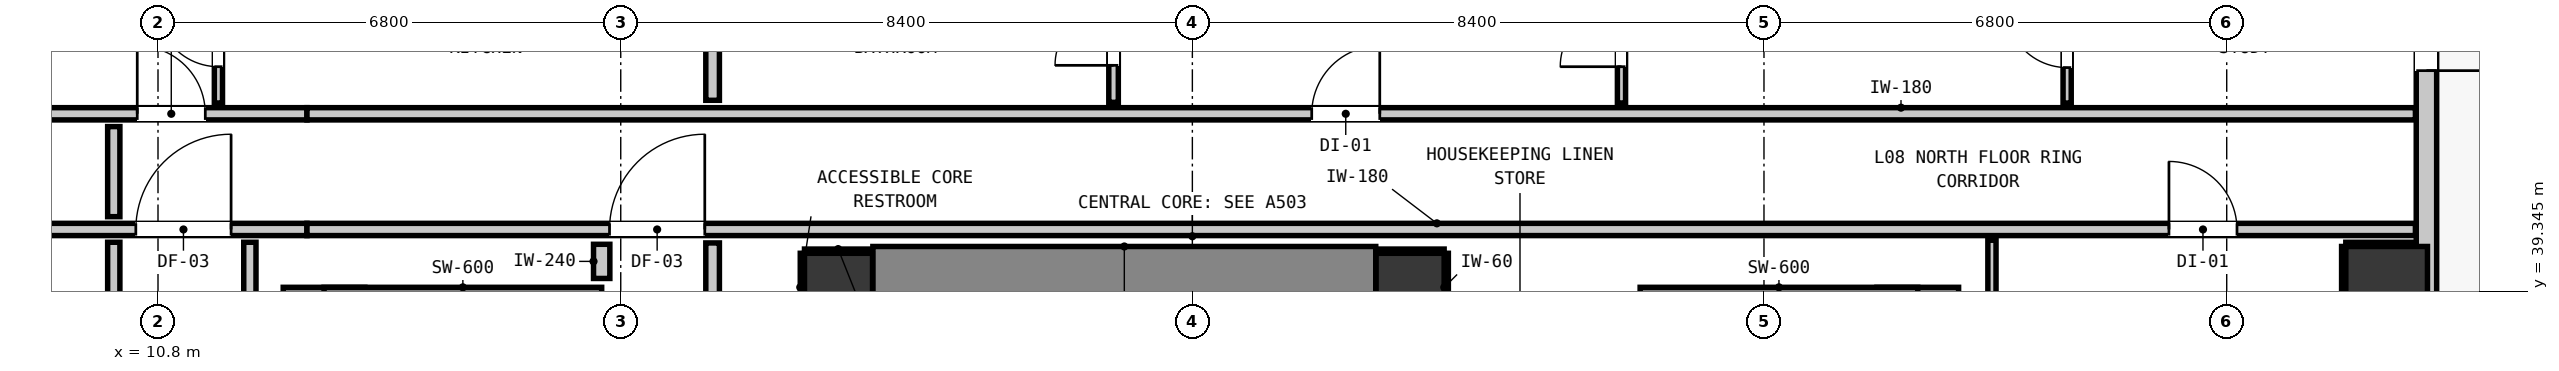
"""IFC4 building model, lengths in metres.
Left out: names, types, materials, properties, quantities, classifications, styles, units other than length and angle.
Written with IfcOpenShell. Run it as: python <this file> out.ifc"""

import sys

from ifc_helpers import new_model, si_unit, direction, frame, frame_2d, origin, origin_2d, place, context, subcontext, project, spatial, rectangle, extrude, element, fill, save


model = new_model("IFC4")
c1 = context("Model", 3, precision=1e-05, world=origin(), true_north=direction((0.0, 1.0)))
c2 = subcontext(c1, "Body", "Model", "MODEL_VIEW")
j1 = project(units=[si_unit("LENGTHUNIT", "METRE"), si_unit("PLANEANGLEUNIT", "RADIAN")], contexts=[c1])
p1 = place(None, origin())
s1 = spatial("IfcSite", under=j1, at=p1, CompositionType="ELEMENT")
p2 = place(p1, origin())
s2 = spatial("IfcBuilding", under=s1, at=p2, CompositionType="ELEMENT")
p3 = place(p2, frame((0.0, 0.0, 31.96)))
s3 = spatial("IfcBuildingStorey", under=s2, at=p3, CompositionType="ELEMENT", Elevation=31.96)
for number, where, z_axis, x_axis in (
    (1, (20.8, 39.4, 0.0), (0.0, 0.0, 1.0), (1.0, 0.0, 0.0)),
    (2, (29.2, 39.4, 0.0), (0.0, 0.0, 1.0), (1.0, 0.0, 0.0)),
):
    element("IfcColumn", number, at=place(p3, frame(where, z_axis=z_axis, x_axis=x_axis)), inside=s3, PredefinedType="COLUMN", context=c2, shape_type="SweptSolid", body=[
        extrude(rectangle(XDim=1.0, YDim=1.0, at=origin_2d()), origin(), (0.0, 0.0, 1.0), 3.32),
    ])
p4 = place(p3, frame((13.24, 31.205, 0.0), z_axis=(0.0, 0.0, 1.0), x_axis=(0.0, 1.0, 0.0)))
e3 = element("IfcWall", 3, at=p4, inside=s3, PredefinedType="SHEAR", context=c2, shape_type="SweptSolid", body=[
    extrude(rectangle(XDim=8.195, YDim=1.2, at=frame_2d((4.097, 0.0))), origin(), (0.0, 0.0, 1.0), 3.32),
])
p5 = place(p3, frame((13.24, 39.1, 0.0), z_axis=(0.0, 0.0, 1.0), x_axis=(1.0, 0.0, 0.0)))
e4 = element("IfcWall", 4, at=p5, inside=s3, PredefinedType="SHEAR", context=c2, shape_type="SweptSolid", body=[
    extrude(rectangle(XDim=4.08, YDim=0.6, at=frame_2d((2.04, 0.0))), origin(), (0.0, 0.0, 1.0), 3.32),
])
p6 = place(p3, frame((36.66, 31.205, 0.0), z_axis=(0.0, 0.0, 1.0), x_axis=(0.0, 1.0, 0.0)))
e5 = element("IfcWall", 5, at=p6, inside=s3, PredefinedType="SHEAR", context=c2, shape_type="SweptSolid", body=[
    extrude(rectangle(XDim=8.195, YDim=1.2, at=frame_2d((4.097, 0.0))), origin(), (0.0, 0.0, 1.0), 3.32),
])
p7 = place(p3, frame((32.58, 39.1, 0.0), z_axis=(0.0, 0.0, 1.0), x_axis=(1.0, 0.0, 0.0)))
e6 = element("IfcWall", 6, at=p7, inside=s3, PredefinedType="SHEAR", context=c2, shape_type="SweptSolid", body=[
    extrude(rectangle(XDim=4.08, YDim=0.6, at=frame_2d((2.04, 0.0))), origin(), (0.0, 0.0, 1.0), 3.32),
])
p8 = place(p3, frame((21.305, 39.4, 0.0), z_axis=(0.0, 0.0, 1.0), x_axis=(1.0, 0.0, 0.0)))
e7 = element("IfcWall", 7, at=p8, inside=s3, PredefinedType="SHEAR", context=c2, shape_type="SweptSolid", body=[
    extrude(rectangle(XDim=7.39, YDim=1.2, at=frame_2d((3.695, 0.0))), origin(), (0.0, 0.0, 1.0), 3.32),
])
p9 = place(p3, frame((43.55, 39.4, 0.0), z_axis=(0.0, 0.0, 1.0), x_axis=(1.0, 0.0, 0.0)))
e8 = element("IfcColumn", 8, at=p9, inside=s3, PredefinedType="COLUMN", context=c2, shape_type="SweptSolid", body=[
    extrude(rectangle(XDim=1.2, YDim=1.2, at=origin_2d()), origin(), (0.0, 0.0, 1.0), 3.32),
])
p10 = place(p3, frame((44.135, 44.835, 0.0), z_axis=(0.0, 0.0, 1.0), x_axis=(0.0, -1.0, 0.0)))
e9 = element("IfcWall", 9, at=p10, inside=s3, PredefinedType="STANDARD", context=c2, shape_type="SweptSolid", body=[
    extrude(rectangle(XDim=34.67, YDim=0.3, at=frame_2d((17.335, 0.0))), origin(), (0.0, 0.0, 1.0), 3.06),
])
p11 = place(p10, frame((1.251, 0.0, 0.0)))
e10 = element("IfcOpeningElement", 10, at=p11, cuts=e9, PredefinedType="OPENING", context=c2, shape_type="SweptSolid", body=[
    extrude(rectangle(XDim=1.0, YDim=2.15, at=frame_2d((0.5, 1.075))), frame((0.0, 0.16, 0.0), z_axis=(0.0, -1.0, 0.0), x_axis=(1.0, 0.0, 0.0)), (0.0, 0.0, 1.0), 0.32),
])
p12 = place(p10, frame((32.583, 0.0, 0.85)))
e11 = element("IfcOpeningElement", 11, at=p12, cuts=e9, PredefinedType="OPENING", context=c2, shape_type="SweptSolid", body=[
    extrude(rectangle(XDim=1.35, YDim=1.85, at=frame_2d((0.675, 0.925))), frame((0.0, 0.16, 0.0), z_axis=(0.0, -1.0, 0.0), x_axis=(1.0, 0.0, 0.0)), (0.0, 0.0, 1.0), 0.32),
])
p13 = place(p10, frame((17.81, 0.0, 0.85)))
e12 = element("IfcOpeningElement", 12, at=p13, cuts=e9, PredefinedType="OPENING", context=c2, shape_type="SweptSolid", body=[
    extrude(rectangle(XDim=1.35, YDim=1.85, at=frame_2d((0.675, 0.925))), frame((0.0, 0.16, 0.0), z_axis=(0.0, -1.0, 0.0), x_axis=(1.0, 0.0, 0.0)), (0.0, 0.0, 1.0), 0.32),
])
p14 = place(p10, frame((6.834, 0.0, 0.85)))
e13 = element("IfcOpeningElement", 13, at=p14, cuts=e9, PredefinedType="OPENING", context=c2, shape_type="SweptSolid", body=[
    extrude(rectangle(XDim=1.35, YDim=1.85, at=frame_2d((0.675, 0.925))), frame((0.0, 0.16, 0.0), z_axis=(0.0, -1.0, 0.0), x_axis=(1.0, 0.0, 0.0)), (0.0, 0.0, 1.0), 0.32),
])
p15 = place(p3, frame((2.661, 40.25, 0.0), z_axis=(0.0, 0.0, 1.0), x_axis=(1.0, 0.0, 0.0)))
e14 = element("IfcWall", 14, at=p15, inside=s3, PredefinedType="PARTITIONING", context=c2, shape_type="SweptSolid", body=[
    extrude(rectangle(XDim=10.328, YDim=0.18, at=frame_2d((5.164, 0.0))), origin(), (0.0, 0.0, 1.0), 2.445),
])
p16 = place(p15, frame((7.813, 0.0, 0.0)))
e15 = element("IfcOpeningElement", 15, at=p16, cuts=e14, PredefinedType="OPENING", context=c2, shape_type="SweptSolid", body=[
    extrude(rectangle(XDim=1.4, YDim=2.15, at=frame_2d((0.7, 1.075))), frame((0.0, 0.1, 0.0), z_axis=(0.0, -1.0, 0.0), x_axis=(1.0, 0.0, 0.0)), (0.0, 0.0, 1.0), 0.2),
])
p17 = place(p3, frame((12.989, 40.25, 0.0), z_axis=(0.0, 0.0, 1.0), x_axis=(1.0, 0.0, 0.0)))
e16 = element("IfcWall", 16, at=p17, inside=s3, PredefinedType="PARTITIONING", context=c2, shape_type="SweptSolid", body=[
    extrude(rectangle(XDim=30.984, YDim=0.18, at=frame_2d((15.492, 0.0))), origin(), (0.0, 0.0, 1.0), 3.06),
])
p18 = place(p17, frame((4.446, 0.0, 0.0)))
e17 = element("IfcOpeningElement", 17, at=p18, cuts=e16, PredefinedType="OPENING", context=c2, shape_type="SweptSolid", body=[
    extrude(rectangle(XDim=1.4, YDim=2.15, at=frame_2d((0.7, 1.075))), frame((0.0, 0.1, 0.0), z_axis=(0.0, -1.0, 0.0), x_axis=(1.0, 0.0, 0.0)), (0.0, 0.0, 1.0), 0.2),
])
p19 = place(p17, frame((27.362, 0.0, 0.0)))
e18 = element("IfcOpeningElement", 18, at=p19, cuts=e16, PredefinedType="OPENING", context=c2, shape_type="SweptSolid", body=[
    extrude(rectangle(XDim=1.0, YDim=2.15, at=frame_2d((0.5, 1.075))), frame((0.0, 0.1, 0.0), z_axis=(0.0, -1.0, 0.0), x_axis=(1.0, 0.0, 0.0)), (0.0, 0.0, 1.0), 0.2),
])
p20 = place(p3, frame((2.661, 41.95, 0.0), z_axis=(0.0, 0.0, 1.0), x_axis=(1.0, 0.0, 0.0)))
e19 = element("IfcWall", 19, at=p20, inside=s3, PredefinedType="PARTITIONING", context=c2, shape_type="SweptSolid", body=[
    extrude(rectangle(XDim=10.328, YDim=0.18, at=frame_2d((5.164, 0.0))), origin(), (0.0, 0.0, 1.0), 2.445),
])
p21 = place(p20, frame((7.834, 0.0, 0.0)))
e20 = element("IfcOpeningElement", 20, at=p21, cuts=e19, PredefinedType="OPENING", context=c2, shape_type="SweptSolid", body=[
    extrude(rectangle(XDim=1.0, YDim=2.15, at=frame_2d((0.5, 1.075))), frame((0.0, 0.1, 0.0), z_axis=(0.0, -1.0, 0.0), x_axis=(1.0, 0.0, 0.0)), (0.0, 0.0, 1.0), 0.2),
])
p22 = place(p3, frame((12.989, 41.95, 0.0), z_axis=(0.0, 0.0, 1.0), x_axis=(1.0, 0.0, 0.0)))
e21 = element("IfcWall", 21, at=p22, inside=s3, PredefinedType="PARTITIONING", context=c2, shape_type="SweptSolid", body=[
    extrude(rectangle(XDim=30.984, YDim=0.18, at=frame_2d((15.492, 0.0))), origin(), (0.0, 0.0, 1.0), 3.06),
])
p23 = place(p22, frame((14.765, 0.0, 0.0)))
e22 = element("IfcOpeningElement", 22, at=p23, cuts=e21, PredefinedType="OPENING", context=c2, shape_type="SweptSolid", body=[
    extrude(rectangle(XDim=1.0, YDim=2.15, at=frame_2d((0.5, 1.075))), frame((0.0, 0.1, 0.0), z_axis=(0.0, -1.0, 0.0), x_axis=(1.0, 0.0, 0.0)), (0.0, 0.0, 1.0), 0.2),
])
p24 = place(p3, frame((17.32, 39.53, 0.0), z_axis=(0.0, 0.0, 1.0), x_axis=(0.0, 1.0, 0.0)))
e23 = element("IfcWall", 23, at=p24, inside=s3, PredefinedType="PARTITIONING", context=c2, shape_type="SweptSolid", body=[
    extrude(rectangle(XDim=0.502, YDim=0.24, at=frame_2d((0.251, 0.0))), origin(), (0.0, 0.0, 1.0), 3.06),
])
p25 = place(p3, frame((18.95, 38.928, 0.0), z_axis=(0.0, 0.0, 1.0), x_axis=(0.0, 1.0, 0.0)))
e24 = element("IfcWall", 24, at=p25, inside=s3, PredefinedType="PARTITIONING", context=c2, shape_type="SweptSolid", body=[
    extrude(rectangle(XDim=1.124, YDim=0.2, at=frame_2d((0.562, 0.0))), origin(), (0.0, 0.0, 1.0), 3.06),
])
p26 = place(p3, frame((18.95, 42.148, 0.0), z_axis=(0.0, 0.0, 1.0), x_axis=(0.0, 1.0, 0.0)))
e25 = element("IfcWall", 25, at=p26, inside=s3, PredefinedType="PARTITIONING", context=c2, shape_type="SweptSolid", body=[
    extrude(rectangle(XDim=1.882, YDim=0.2, at=frame_2d((0.941, 0.0))), origin(), (0.0, 0.0, 1.0), 3.06),
])
p27 = place(p3, frame((10.15, 34.688, 0.0), z_axis=(0.0, 0.0, 1.0), x_axis=(0.0, 1.0, 0.0)))
e26 = element("IfcWall", 26, at=p27, inside=s3, PredefinedType="PARTITIONING", context=c2, shape_type="SweptSolid", body=[
    extrude(rectangle(XDim=5.374, YDim=0.18, at=frame_2d((2.687, 0.0))), origin(), (0.0, 0.0, 1.0), 3.06),
])
p28 = place(p3, frame((10.15, 40.438, 0.0), z_axis=(0.0, 0.0, 1.0), x_axis=(0.0, 1.0, 0.0)))
e27 = element("IfcWall", 27, at=p28, inside=s3, PredefinedType="PARTITIONING", context=c2, shape_type="SweptSolid", body=[
    extrude(rectangle(XDim=1.324, YDim=0.18, at=frame_2d((0.662, 0.0))), origin(), (0.0, 0.0, 1.0), 3.06),
])
p29 = place(p3, frame((12.15, 21.368, 0.0), z_axis=(0.0, 0.0, 1.0), x_axis=(0.0, 1.0, 0.0)))
e28 = element("IfcWall", 28, at=p29, inside=s3, PredefinedType="PARTITIONING", context=c2, shape_type="SweptSolid", body=[
    extrude(rectangle(XDim=18.694, YDim=0.18, at=frame_2d((9.347, 0.0))), origin(), (0.0, 0.0, 1.0), 3.06),
])
p30 = place(p3, frame((24.842, 42.118, 0.0), z_axis=(0.0, 0.0, 1.0), x_axis=(0.0, 1.0, 0.0)))
e29 = element("IfcWall", 29, at=p30, inside=s3, PredefinedType="PARTITIONING", context=c2, shape_type="SweptSolid", body=[
    extrude(rectangle(XDim=1.942, YDim=0.14, at=frame_2d((0.971, 0.0))), origin(), (0.0, 0.0, 1.0), 3.06),
])
p31 = place(p30, frame((0.544, 0.0, 0.0)))
e30 = element("IfcOpeningElement", 30, at=p31, cuts=e29, PredefinedType="OPENING", context=c2, shape_type="SweptSolid", body=[
    extrude(rectangle(XDim=0.86, YDim=2.02, at=frame_2d((0.43, 1.01))), frame((0.0, 0.08, 0.0), z_axis=(0.0, -1.0, 0.0), x_axis=(1.0, 0.0, 0.0)), (0.0, 0.0, 1.0), 0.16),
])
p32 = place(p3, frame((11.688, 42.108, 0.0), z_axis=(0.0, 0.0, 1.0), x_axis=(0.0, 1.0, 0.0)))
e31 = element("IfcWall", 31, at=p32, inside=s3, PredefinedType="PARTITIONING", context=c2, shape_type="SweptSolid", body=[
    extrude(rectangle(XDim=5.065, YDim=0.12, at=frame_2d((2.533, 0.0))), origin(), (0.0, 0.0, 1.0), 3.06),
])
p33 = place(p32, frame((0.534, 0.0, 0.0)))
e32 = element("IfcOpeningElement", 32, at=p33, cuts=e31, PredefinedType="OPENING", context=c2, shape_type="SweptSolid", body=[
    extrude(rectangle(XDim=0.9, YDim=2.1, at=frame_2d((0.45, 1.05))), frame((0.0, 0.07, 0.0), z_axis=(0.0, -1.0, 0.0), x_axis=(1.0, 0.0, 0.0)), (0.0, 0.0, 1.0), 0.14),
])
p34 = place(p32, frame((2.893, 0.0, 0.0)))
e33 = element("IfcOpeningElement", 33, at=p34, cuts=e31, PredefinedType="OPENING", context=c2, shape_type="SweptSolid", body=[
    extrude(rectangle(XDim=0.9, YDim=2.1, at=frame_2d((0.45, 1.05))), frame((0.0, 0.07, 0.0), z_axis=(0.0, -1.0, 0.0), x_axis=(1.0, 0.0, 0.0)), (0.0, 0.0, 1.0), 0.14),
])
p35 = place(p3, frame((32.306, 42.108, 0.0), z_axis=(0.0, 0.0, 1.0), x_axis=(0.0, 1.0, 0.0)))
e34 = element("IfcWall", 34, at=p35, inside=s3, PredefinedType="PARTITIONING", context=c2, shape_type="SweptSolid", body=[
    extrude(rectangle(XDim=1.962, YDim=0.12, at=frame_2d((0.981, 0.0))), origin(), (0.0, 0.0, 1.0), 3.06),
])
p36 = place(p35, frame((0.534, 0.0, 0.0)))
e35 = element("IfcOpeningElement", 35, at=p36, cuts=e34, PredefinedType="OPENING", context=c2, shape_type="SweptSolid", body=[
    extrude(rectangle(XDim=0.9, YDim=2.1, at=frame_2d((0.45, 1.05))), frame((0.0, 0.07, 0.0), z_axis=(0.0, -1.0, 0.0), x_axis=(1.0, 0.0, 0.0)), (0.0, 0.0, 1.0), 0.14),
])
p37 = place(p3, frame((37.75, 35.818, 0.0), z_axis=(0.0, 0.0, 1.0), x_axis=(0.0, 1.0, 0.0)))
e36 = element("IfcWall", 36, at=p37, inside=s3, PredefinedType="PARTITIONING", context=c2, shape_type="SweptSolid", body=[
    extrude(rectangle(XDim=4.274, YDim=0.12, at=frame_2d((2.137, 0.0))), origin(), (0.0, 0.0, 1.0), 3.06),
])
p38 = place(p3, frame((38.855, 42.108, 0.0), z_axis=(0.0, 0.0, 1.0), x_axis=(0.0, 1.0, 0.0)))
e37 = element("IfcWall", 37, at=p38, inside=s3, PredefinedType="PARTITIONING", context=c2, shape_type="SweptSolid", body=[
    extrude(rectangle(XDim=1.962, YDim=0.12, at=frame_2d((0.981, 0.0))), origin(), (0.0, 0.0, 1.0), 3.06),
])
p39 = place(p38, frame((0.521, 0.0, 0.0)))
e38 = element("IfcOpeningElement", 38, at=p39, cuts=e37, PredefinedType="OPENING", context=c2, shape_type="SweptSolid", body=[
    extrude(rectangle(XDim=0.9, YDim=2.1, at=frame_2d((0.45, 1.05))), frame((0.0, 0.07, 0.0), z_axis=(0.0, -1.0, 0.0), x_axis=(1.0, 0.0, 0.0)), (0.0, 0.0, 1.0), 0.14),
])
p40 = place(p3, frame((20.3, 39.932, 0.0), z_axis=(0.0, 0.0, 1.0), x_axis=(1.0, 0.0, 0.0)))
e39 = element("IfcWall", 39, at=p40, inside=s3, PredefinedType="PARTITIONING", context=c2, shape_type="SweptSolid", body=[
    extrude(rectangle(XDim=0.99, YDim=0.06, at=frame_2d((0.495, 0.0))), origin(), (0.0, 0.0, 1.0), 1.45),
])
p41 = place(p3, frame((20.268, 38.9, 0.0), z_axis=(0.0, 0.0, 1.0), x_axis=(0.0, 1.0, 0.0)))
e40 = element("IfcWall", 40, at=p41, inside=s3, PredefinedType="PARTITIONING", context=c2, shape_type="SweptSolid", body=[
    extrude(rectangle(XDim=1.0, YDim=0.06, at=frame_2d((0.5, 0.0))), origin(), (0.0, 0.0, 1.0), 1.45),
])
p42 = place(p3, frame((28.71, 39.932, 0.0), z_axis=(0.0, 0.0, 1.0), x_axis=(1.0, 0.0, 0.0)))
e41 = element("IfcWall", 41, at=p42, inside=s3, PredefinedType="PARTITIONING", context=c2, shape_type="SweptSolid", body=[
    extrude(rectangle(XDim=0.99, YDim=0.06, at=frame_2d((0.495, 0.0))), origin(), (0.0, 0.0, 1.0), 1.45),
])
p43 = place(p3, frame((29.732, 38.9, 0.0), z_axis=(0.0, 0.0, 1.0), x_axis=(0.0, 1.0, 0.0)))
e42 = element("IfcWall", 42, at=p43, inside=s3, PredefinedType="PARTITIONING", context=c2, shape_type="SweptSolid", body=[
    extrude(rectangle(XDim=1.0, YDim=0.06, at=frame_2d((0.5, 0.0))), origin(), (0.0, 0.0, 1.0), 1.45),
])
p44 = place(p3, frame((42.95, 40.032, 0.0), z_axis=(0.0, 0.0, 1.0), x_axis=(1.0, 0.0, 0.0)))
e43 = element("IfcWall", 43, at=p44, inside=s3, PredefinedType="PARTITIONING", context=c2, shape_type="SweptSolid", body=[
    extrude(rectangle(XDim=1.02, YDim=0.06, at=frame_2d((0.51, 0.0))), origin(), (0.0, 0.0, 1.0), 1.45),
])
p45 = place(p3, frame((42.918, 38.8, 0.0), z_axis=(0.0, 0.0, 1.0), x_axis=(0.0, 1.0, 0.0)))
e44 = element("IfcWall", 44, at=p45, inside=s3, PredefinedType="PARTITIONING", context=c2, shape_type="SweptSolid", body=[
    extrude(rectangle(XDim=1.2, YDim=0.06, at=frame_2d((0.6, 0.0))), origin(), (0.0, 0.0, 1.0), 1.45),
])
p46 = place(p11, origin())
e45 = element("IfcDoor", 45, at=p46, inside=s3, OperationType="SINGLE_SWING_RIGHT", PredefinedType="DOOR", context=c2, shape_type="SweptSolid", body=[
    extrude(rectangle(XDim=1.0, YDim=2.15, at=frame_2d((0.5, 1.075))), frame((0.0, 0.025, 0.0), z_axis=(0.0, -1.0, 0.0), x_axis=(1.0, 0.0, 0.0)), (0.0, 0.0, 1.0), 0.05),
])
fill(e10, e45)
p47 = place(p18, origin())
e46 = element("IfcDoor", 46, at=p47, inside=s3, OperationType="SINGLE_SWING_RIGHT", PredefinedType="DOOR", context=c2, shape_type="SweptSolid", body=[
    extrude(rectangle(XDim=1.4, YDim=2.15, at=frame_2d((0.7, 1.075))), frame((0.0, 0.025, 0.0), z_axis=(0.0, -1.0, 0.0), x_axis=(1.0, 0.0, 0.0)), (0.0, 0.0, 1.0), 0.05),
])
fill(e17, e46)
p48 = place(p16, origin())
e47 = element("IfcDoor", 47, at=p48, inside=s3, OperationType="SINGLE_SWING_RIGHT", PredefinedType="DOOR", context=c2, shape_type="SweptSolid", body=[
    extrude(rectangle(XDim=1.4, YDim=2.15, at=frame_2d((0.7, 1.075))), frame((0.0, 0.025, 0.0), z_axis=(0.0, -1.0, 0.0), x_axis=(1.0, 0.0, 0.0)), (0.0, 0.0, 1.0), 0.05),
])
fill(e15, e47)
p49 = place(p21, origin())
e48 = element("IfcDoor", 48, at=p49, inside=s3, OperationType="SINGLE_SWING_LEFT", PredefinedType="DOOR", context=c2, shape_type="SweptSolid", body=[
    extrude(rectangle(XDim=1.0, YDim=2.15, at=frame_2d((0.5, 1.075))), frame((0.0, 0.025, 0.0), z_axis=(0.0, -1.0, 0.0), x_axis=(1.0, 0.0, 0.0)), (0.0, 0.0, 1.0), 0.05),
])
fill(e20, e48)
p50 = place(p33, origin())
e49 = element("IfcDoor", 49, at=p50, inside=s3, OperationType="SINGLE_SWING_RIGHT", PredefinedType="DOOR", context=c2, shape_type="SweptSolid", body=[
    extrude(rectangle(XDim=0.9, YDim=2.1, at=frame_2d((0.45, 1.05))), frame((0.0, 0.025, 0.0), z_axis=(0.0, -1.0, 0.0), x_axis=(1.0, 0.0, 0.0)), (0.0, 0.0, 1.0), 0.05),
])
fill(e32, e49)
p51 = place(p23, origin())
e50 = element("IfcDoor", 50, at=p51, inside=s3, OperationType="SINGLE_SWING_RIGHT", PredefinedType="DOOR", context=c2, shape_type="SweptSolid", body=[
    extrude(rectangle(XDim=1.0, YDim=2.15, at=frame_2d((0.5, 1.075))), frame((0.0, 0.025, 0.0), z_axis=(0.0, -1.0, 0.0), x_axis=(1.0, 0.0, 0.0)), (0.0, 0.0, 1.0), 0.05),
])
fill(e22, e50)
p52 = place(p31, origin())
e51 = element("IfcDoor", 51, at=p52, inside=s3, OperationType="SINGLE_SWING_LEFT", PredefinedType="DOOR", context=c2, shape_type="SweptSolid", body=[
    extrude(rectangle(XDim=0.86, YDim=2.02, at=frame_2d((0.43, 1.01))), frame((0.0, 0.025, 0.0), z_axis=(0.0, -1.0, 0.0), x_axis=(1.0, 0.0, 0.0)), (0.0, 0.0, 1.0), 0.05),
])
fill(e30, e51)
p53 = place(p36, origin())
e52 = element("IfcDoor", 52, at=p53, inside=s3, OperationType="SINGLE_SWING_LEFT", PredefinedType="DOOR", context=c2, shape_type="SweptSolid", body=[
    extrude(rectangle(XDim=0.9, YDim=2.1, at=frame_2d((0.45, 1.05))), frame((0.0, 0.025, 0.0), z_axis=(0.0, -1.0, 0.0), x_axis=(1.0, 0.0, 0.0)), (0.0, 0.0, 1.0), 0.05),
])
fill(e35, e52)
p54 = place(p39, origin())
e53 = element("IfcDoor", 53, at=p54, inside=s3, OperationType="SINGLE_SWING_RIGHT", PredefinedType="DOOR", context=c2, shape_type="SweptSolid", body=[
    extrude(rectangle(XDim=0.9, YDim=2.1, at=frame_2d((0.45, 1.05))), frame((0.0, 0.025, 0.0), z_axis=(0.0, -1.0, 0.0), x_axis=(1.0, 0.0, 0.0)), (0.0, 0.0, 1.0), 0.05),
])
fill(e38, e53)
p55 = place(p19, origin())
e54 = element("IfcDoor", 54, at=p55, inside=s3, OperationType="SINGLE_SWING_LEFT", PredefinedType="DOOR", context=c2, shape_type="SweptSolid", body=[
    extrude(rectangle(XDim=1.0, YDim=2.15, at=frame_2d((0.5, 1.075))), frame((0.0, 0.025, 0.0), z_axis=(0.0, -1.0, 0.0), x_axis=(1.0, 0.0, 0.0)), (0.0, 0.0, 1.0), 0.05),
])
fill(e18, e54)
save(model, sys.argv[1])
